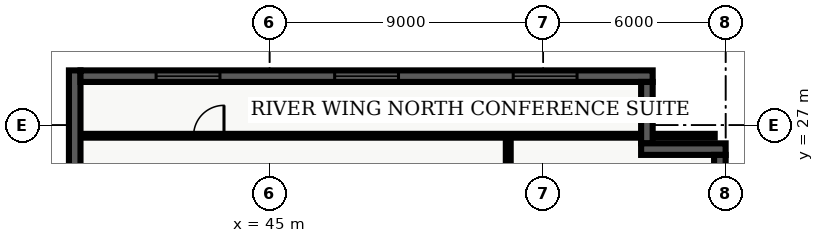
"""IFC4 building model, lengths in metres.
Left out: names, types, materials, properties, quantities, classifications, styles, units other than length and angle.
Written with IfcOpenShell. Run it as: python <this file> out.ifc"""

import sys

from ifc_helpers import new_model, entity, si_unit, converted_unit, direction, frame, origin_with_axes, origin_2d_with_axis, place, context, subcontext, project, spatial, polyline, rectangle, outline, extrude, element, fill, save


model = new_model("IFC4")
c1 = context("Model", 3, precision=1e-05, world=origin_with_axes(), true_north=direction((0.0, 1.0)))
c2 = subcontext(c1, "Body", "Model", "MODEL_VIEW")
j1 = project(units=[si_unit("LENGTHUNIT", "METRE"), converted_unit("PLANEANGLEUNIT", "DEGREE", entity("IfcPlaneAngleMeasure", 0.017), si_unit("PLANEANGLEUNIT", "RADIAN"), dimensions=[0, 0, 0, 0, 0, 0, 0])], contexts=[c1])
p1 = place(None, origin_with_axes())
s1 = spatial("IfcSite", under=j1, at=p1, CompositionType="ELEMENT")
p2 = place(p1, origin_with_axes())
s2 = spatial("IfcBuilding", under=s1, at=p2, CompositionType="ELEMENT")
p3 = place(p2, frame((0.0, 0.0, 60.0), z_axis=(0.0, 0.0, 1.0), x_axis=(1.0, 0.0, 0.0)))
s3 = spatial("IfcBuildingStorey", under=s2, at=p3, CompositionType="ELEMENT", Elevation=60.0)
p4 = place(p3, frame((52.85, 7.85, 0.0), z_axis=(0.0, 0.0, 1.0), x_axis=(0.0, 1.0, 0.0)))
e1 = element("IfcWall", 1, at=p4, inside=s3, PredefinedType="PARTITIONING", context=c2, shape_type="SweptSolid", body=[
    extrude(outline(polyline([(0.0, -0.08), (18.8, -0.08), (18.8, 0.08), (0.0, 0.08), (0.0, -0.08)])), origin_with_axes(), (0.0, 0.0, 1.0), 2.7),
])
p5 = place(p4, frame((4.484, 0.0, 0.0), z_axis=(0.0, 0.0, 1.0), x_axis=(1.0, 0.0, 0.0)))
e2 = element("IfcOpeningElement", 2, at=p5, cuts=e1, PredefinedType="OPENING", context=c2, shape_type="SweptSolid", body=[
    extrude(rectangle(XDim=1.0, YDim=0.18, at=origin_2d_with_axis()), origin_with_axes(), (0.0, 0.0, 1.0), 2.15),
])
p6 = place(p4, frame((7.687, 0.0, 0.0), z_axis=(0.0, 0.0, 1.0), x_axis=(1.0, 0.0, 0.0)))
e3 = element("IfcOpeningElement", 3, at=p6, cuts=e1, PredefinedType="OPENING", context=c2, shape_type="SweptSolid", body=[
    extrude(rectangle(XDim=1.0, YDim=0.18, at=origin_2d_with_axis()), origin_with_axes(), (0.0, 0.0, 1.0), 2.15),
])
p7 = place(p4, frame((13.79, 0.0, 0.0), z_axis=(0.0, 0.0, 1.0), x_axis=(1.0, 0.0, 0.0)))
e4 = element("IfcOpeningElement", 4, at=p7, cuts=e1, PredefinedType="OPENING", context=c2, shape_type="SweptSolid", body=[
    extrude(rectangle(XDim=1.0, YDim=0.18, at=origin_2d_with_axis()), origin_with_axes(), (0.0, 0.0, 1.0), 2.15),
])
p8 = place(p3, frame((38.76, 26.65, 0.0), z_axis=(0.0, 0.0, 1.0), x_axis=(1.0, 0.0, 0.0)))
e5 = element("IfcWall", 5, at=p8, inside=s3, PredefinedType="PARTITIONING", context=c2, shape_type="SweptSolid", body=[
    extrude(outline(polyline([(0.0, -0.062), (20.88, -0.062), (20.88, 0.062), (0.0, 0.062), (0.0, -0.062)])), origin_with_axes(), (0.0, 0.0, 1.0), 2.7),
])
p9 = place(p8, frame((4.24, 0.0, 0.0), z_axis=(0.0, 0.0, 1.0), x_axis=(1.0, 0.0, 0.0)))
e6 = element("IfcOpeningElement", 6, at=p9, cuts=e5, PredefinedType="OPENING", context=c2, shape_type="SweptSolid", body=[
    extrude(rectangle(XDim=1.0, YDim=0.145, at=origin_2d_with_axis()), origin_with_axes(), (0.0, 0.0, 1.0), 2.15),
])
p10 = place(p3, frame((38.59, 21.22, 0.0), z_axis=(0.0, 0.0, 1.0), x_axis=(0.0, 1.0, 0.0)))
e7 = element("IfcWall", 7, at=p10, inside=s3, PredefinedType="SOLIDWALL", context=c2, shape_type="SweptSolid", body=[
    extrude(outline(polyline([(0.0, -0.19), (7.58, -0.19), (7.58, 0.19), (0.0, 0.19), (0.0, -0.19)])), origin_with_axes(), (0.0, 0.0, 1.0), 3.66),
])
p11 = place(p3, frame((38.78, 28.61, 0.0), z_axis=(0.0, 0.0, 1.0), x_axis=(1.0, 0.0, 0.0)))
e8 = element("IfcWall", 8, at=p11, inside=s3, PredefinedType="SOLIDWALL", context=c2, shape_type="SweptSolid", body=[
    extrude(outline(polyline([(0.0, -0.19), (18.82, -0.19), (18.82, 0.19), (0.0, 0.19), (0.0, -0.19)])), origin_with_axes(), (0.0, 0.0, 1.0), 3.66),
])
p12 = place(p11, frame((3.537, 0.0, 0.45), z_axis=(0.0, 0.0, 1.0), x_axis=(1.0, 0.0, 0.0)))
e9 = element("IfcOpeningElement", 9, at=p12, cuts=e8, PredefinedType="OPENING", context=c2, shape_type="SweptSolid", body=[
    extrude(rectangle(XDim=2.1, YDim=0.4, at=origin_2d_with_axis()), origin_with_axes(), (0.0, 0.0, 1.0), 2.2),
])
p13 = place(p11, frame((9.41, 0.0, 0.45), z_axis=(0.0, 0.0, 1.0), x_axis=(1.0, 0.0, 0.0)))
e10 = element("IfcOpeningElement", 10, at=p13, cuts=e8, PredefinedType="OPENING", context=c2, shape_type="SweptSolid", body=[
    extrude(rectangle(XDim=2.1, YDim=0.4, at=origin_2d_with_axis()), origin_with_axes(), (0.0, 0.0, 1.0), 2.2),
])
p14 = place(p11, frame((15.283, 0.0, 0.45), z_axis=(0.0, 0.0, 1.0), x_axis=(1.0, 0.0, 0.0)))
e11 = element("IfcOpeningElement", 11, at=p14, cuts=e8, PredefinedType="OPENING", context=c2, shape_type="SweptSolid", body=[
    extrude(rectangle(XDim=2.1, YDim=0.4, at=origin_2d_with_axis()), origin_with_axes(), (0.0, 0.0, 1.0), 2.2),
])
p15 = place(p3, frame((57.41, 28.42, 0.0), z_axis=(0.0, 0.0, 1.0), x_axis=(0.0, -1.0, 0.0)))
e12 = element("IfcWall", 12, at=p15, inside=s3, PredefinedType="SOLIDWALL", context=c2, shape_type="SweptSolid", body=[
    extrude(outline(polyline([(0.0, -0.19), (2.02, -0.19), (2.02, 0.19), (0.0, 0.19), (0.0, -0.19)])), origin_with_axes(), (0.0, 0.0, 1.0), 3.66),
])
p16 = place(p3, frame((57.22, 26.21, 0.0), z_axis=(0.0, 0.0, 1.0), x_axis=(1.0, 0.0, 0.0)))
e13 = element("IfcWall", 13, at=p16, inside=s3, PredefinedType="SOLIDWALL", context=c2, shape_type="SweptSolid", body=[
    extrude(outline(polyline([(0.0, -0.19), (2.78, -0.19), (2.78, 0.19), (0.0, 0.19), (0.0, -0.19)])), origin_with_axes(), (0.0, 0.0, 1.0), 3.66),
])
p17 = place(p3, frame((59.81, 26.02, 0.0), z_axis=(0.0, 0.0, 1.0), x_axis=(0.0, -1.0, 0.0)))
e14 = element("IfcWall", 14, at=p17, inside=s3, PredefinedType="SOLIDWALL", context=c2, shape_type="SweptSolid", body=[
    extrude(outline(polyline([(0.0, -0.19), (23.62, -0.19), (23.62, 0.19), (0.0, 0.19), (0.0, -0.19)])), origin_with_axes(), (0.0, 0.0, 1.0), 3.66),
])
p18 = place(p17, frame((3.853, 0.0, 0.45), z_axis=(0.0, 0.0, 1.0), x_axis=(1.0, 0.0, 0.0)))
e15 = element("IfcOpeningElement", 15, at=p18, cuts=e14, PredefinedType="OPENING", context=c2, shape_type="SweptSolid", body=[
    extrude(rectangle(XDim=2.1, YDim=0.4, at=origin_2d_with_axis()), origin_with_axes(), (0.0, 0.0, 1.0), 2.2),
])
p19 = place(p17, frame((20.218, 0.0, 0.45), z_axis=(0.0, 0.0, 1.0), x_axis=(1.0, 0.0, 0.0)))
e16 = element("IfcOpeningElement", 16, at=p19, cuts=e14, PredefinedType="OPENING", context=c2, shape_type="SweptSolid", body=[
    extrude(rectangle(XDim=2.1, YDim=0.4, at=origin_2d_with_axis()), origin_with_axes(), (0.0, 0.0, 1.0), 2.2),
])
p20 = place(p8, frame((4.24, 0.0, 0.0), z_axis=(0.0, 0.0, 1.0), x_axis=(1.0, 0.0, 0.0)))
e17 = element("IfcDoor", 17, at=p20, inside=s3, OperationType="SINGLE_SWING_RIGHT", PredefinedType="DOOR", context=c2, shape_type="SweptSolid", body=[
    extrude(rectangle(XDim=1.0, YDim=0.075, at=origin_2d_with_axis()), origin_with_axes(), (0.0, 0.0, 1.0), 2.15),
])
fill(e6, e17)
p21 = place(p11, frame((3.537, 0.0, 0.45), z_axis=(0.0, 0.0, 1.0), x_axis=(1.0, 0.0, 0.0)))
e18 = element("IfcWindow", 18, at=p21, inside=s3, PredefinedType="WINDOW", context=c2, shape_type="SweptSolid", body=[
    extrude(rectangle(XDim=2.1, YDim=0.09, at=origin_2d_with_axis()), origin_with_axes(), (0.0, 0.0, 1.0), 2.2),
])
fill(e9, e18)
p22 = place(p11, frame((9.41, 0.0, 0.45), z_axis=(0.0, 0.0, 1.0), x_axis=(1.0, 0.0, 0.0)))
e19 = element("IfcWindow", 19, at=p22, inside=s3, PredefinedType="WINDOW", context=c2, shape_type="SweptSolid", body=[
    extrude(rectangle(XDim=2.1, YDim=0.09, at=origin_2d_with_axis()), origin_with_axes(), (0.0, 0.0, 1.0), 2.2),
])
fill(e10, e19)
p23 = place(p11, frame((15.283, 0.0, 0.45), z_axis=(0.0, 0.0, 1.0), x_axis=(1.0, 0.0, 0.0)))
e20 = element("IfcWindow", 20, at=p23, inside=s3, PredefinedType="WINDOW", context=c2, shape_type="SweptSolid", body=[
    extrude(rectangle(XDim=2.1, YDim=0.09, at=origin_2d_with_axis()), origin_with_axes(), (0.0, 0.0, 1.0), 2.2),
])
fill(e11, e20)
save(model, sys.argv[1])
